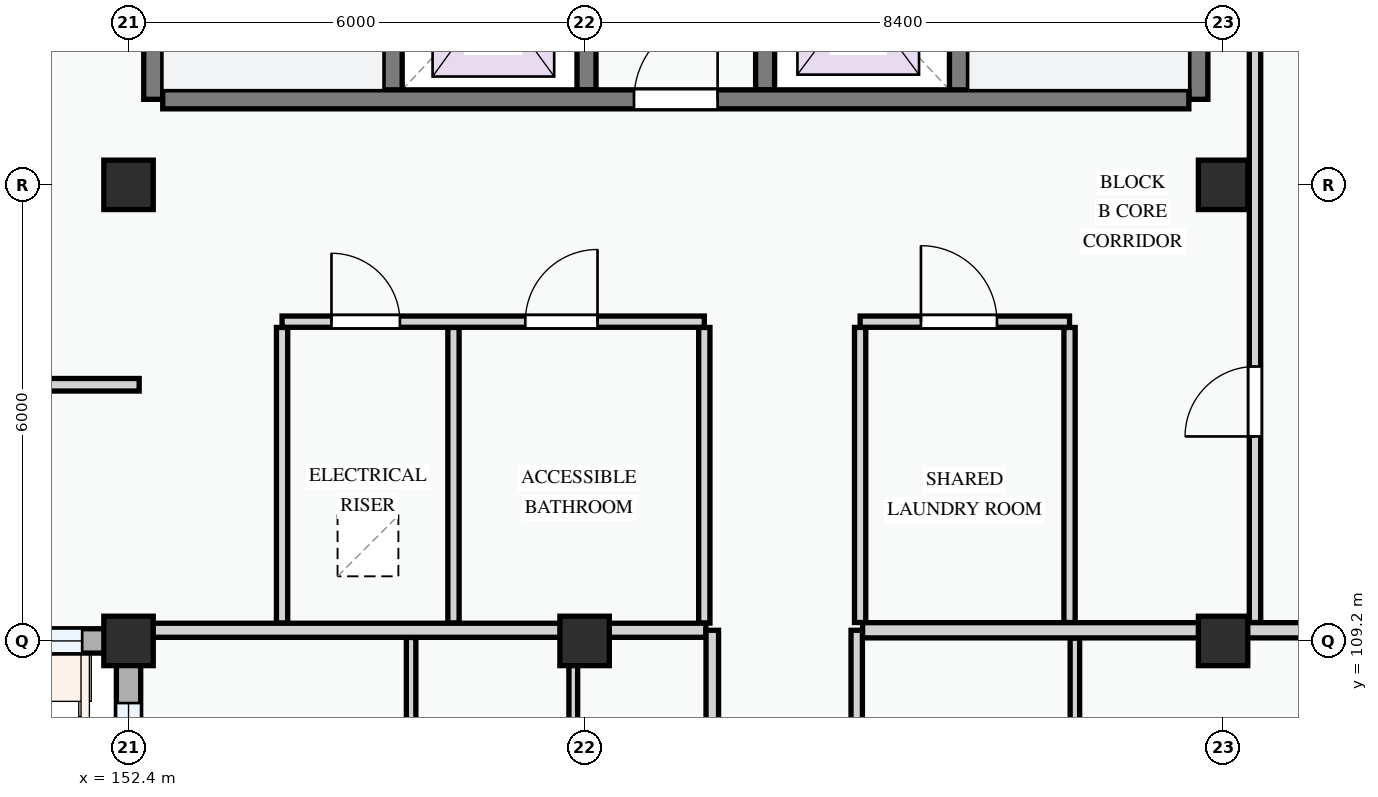
"""IFC4 building model, lengths in metres.
Left out: names, types, materials, properties, quantities, classifications, styles, units other than length and angle.
Written with IfcOpenShell. Run it as: python <this file> out.ifc"""

import sys

from ifc_helpers import new_model, si_unit, direction, frame, frame_2d, origin, origin_2d, place, context, subcontext, project, spatial, rectangle, extrude, element, fill, save


model = new_model("IFC4")
c1 = context("Model", 3, precision=1e-05, world=origin(), true_north=direction((0.0, 1.0)))
c2 = subcontext(c1, "Body", "Model", "MODEL_VIEW")
j1 = project(units=[si_unit("LENGTHUNIT", "METRE"), si_unit("PLANEANGLEUNIT", "RADIAN")], contexts=[c1])
p1 = place(None, origin())
s1 = spatial("IfcSite", under=j1, at=p1, CompositionType="ELEMENT")
p2 = place(p1, origin())
s2 = spatial("IfcBuilding", under=s1, at=p2, CompositionType="ELEMENT")
p3 = place(p2, frame((0.0, 0.0, 18.0)))
s3 = spatial("IfcBuildingStorey", under=s2, at=p3, CompositionType="ELEMENT", Elevation=18.0)
for number, where, z_axis, x_axis in (
    (1, (152.4, 109.2, 0.0), (0.0, 0.0, 1.0), (1.0, 0.0, 0.0)),
    (2, (152.4, 115.2, 0.0), (0.0, 0.0, 1.0), (1.0, 0.0, 0.0)),
    (3, (158.4, 109.2, 0.0), (0.0, 0.0, 1.0), (1.0, 0.0, 0.0)),
    (4, (166.8, 109.2, 0.0), (0.0, 0.0, 1.0), (1.0, 0.0, 0.0)),
    (5, (166.8, 115.2, 0.0), (0.0, 0.0, 1.0), (1.0, 0.0, 0.0)),
):
    element("IfcColumn", number, at=place(p3, frame(where, z_axis=z_axis, x_axis=x_axis)), inside=s3, PredefinedType="COLUMN", context=c2, shape_type="SweptSolid", body=[
        extrude(rectangle(XDim=0.65, YDim=0.65, at=origin_2d()), origin(), (0.0, 0.0, 1.0), 3.3),
    ])
p4 = place(p3, frame((144.0, 109.2, 0.0), z_axis=(0.0, 0.0, 1.0), x_axis=(1.0, 0.0, 0.0)))
e6 = element("IfcWall", 6, at=p4, inside=s3, PredefinedType="STANDARD", context=c2, shape_type="SweptSolid", body=[
    extrude(rectangle(XDim=8.4, YDim=0.32, at=frame_2d((4.2, 0.0))), origin(), (0.0, 0.0, 1.0), 2.375),
])
p5 = place(p4, frame((0.6, 0.0, 0.78)))
e7 = element("IfcOpeningElement", 7, at=p5, cuts=e6, PredefinedType="OPENING", context=c2, shape_type="SweptSolid", body=[
    extrude(rectangle(XDim=2.18, YDim=1.48, at=frame_2d((1.09, 0.74))), frame((0.0, 0.17, 0.0), z_axis=(0.0, -1.0, 0.0), x_axis=(1.0, 0.0, 0.0)), (0.0, 0.0, 1.0), 0.34),
])
p6 = place(p4, frame((3.9, 0.0, 0.78)))
e8 = element("IfcOpeningElement", 8, at=p6, cuts=e6, PredefinedType="OPENING", context=c2, shape_type="SweptSolid", body=[
    extrude(rectangle(XDim=1.3, YDim=1.4, at=frame_2d((0.65, 0.7))), frame((0.0, 0.17, 0.0), z_axis=(0.0, -1.0, 0.0), x_axis=(1.0, 0.0, 0.0)), (0.0, 0.0, 1.0), 0.34),
])
p7 = place(p4, frame((6.47, 0.0, 0.78)))
e9 = element("IfcOpeningElement", 9, at=p7, cuts=e6, PredefinedType="OPENING", context=c2, shape_type="SweptSolid", body=[
    extrude(rectangle(XDim=1.32, YDim=1.35, at=frame_2d((0.66, 0.675))), frame((0.0, 0.17, 0.0), z_axis=(0.0, -1.0, 0.0), x_axis=(1.0, 0.0, 0.0)), (0.0, 0.0, 1.0), 0.34),
])
p8 = place(p3, frame((152.4, 109.2, 0.0), z_axis=(0.0, 0.0, 1.0), x_axis=(0.0, -1.0, 0.0)))
e10 = element("IfcWall", 10, at=p8, inside=s3, PredefinedType="STANDARD", context=c2, shape_type="SweptSolid", body=[
    extrude(rectangle(XDim=8.4, YDim=0.32, at=frame_2d((4.2, 0.0))), origin(), (0.0, 0.0, 1.0), 2.425),
])
p9 = place(p8, frame((0.817, 0.0, 0.78)))
e11 = element("IfcOpeningElement", 11, at=p9, cuts=e10, PredefinedType="OPENING", context=c2, shape_type="SweptSolid", body=[
    extrude(rectangle(XDim=1.25, YDim=1.45, at=frame_2d((0.625, 0.725))), frame((0.0, 0.17, 0.0), z_axis=(0.0, -1.0, 0.0), x_axis=(1.0, 0.0, 0.0)), (0.0, 0.0, 1.0), 0.34),
])
p10 = place(p8, frame((2.998, 0.0, 0.78)))
e12 = element("IfcOpeningElement", 12, at=p10, cuts=e10, PredefinedType="OPENING", context=c2, shape_type="SweptSolid", body=[
    extrude(rectangle(XDim=1.62, YDim=1.38, at=frame_2d((0.81, 0.69))), frame((0.0, 0.17, 0.0), z_axis=(0.0, -1.0, 0.0), x_axis=(1.0, 0.0, 0.0)), (0.0, 0.0, 1.0), 0.34),
])
p11 = place(p8, frame((5.935, 0.0, 0.78)))
e13 = element("IfcOpeningElement", 13, at=p11, cuts=e10, PredefinedType="OPENING", context=c2, shape_type="SweptSolid", body=[
    extrude(rectangle(XDim=1.4, YDim=1.45, at=frame_2d((0.7, 0.725))), frame((0.0, 0.17, 0.0), z_axis=(0.0, -1.0, 0.0), x_axis=(1.0, 0.0, 0.0)), (0.0, 0.0, 1.0), 0.34),
])
p12 = place(p3, frame((155.875, 123.25, 0.0), z_axis=(0.0, 0.0, 1.0), x_axis=(0.0, -1.0, 0.0)))
e14 = element("IfcWall", 14, at=p12, inside=s3, PredefinedType="SHEAR", context=c2, shape_type="SweptSolid", body=[
    extrude(rectangle(XDim=6.925, YDim=0.25, at=frame_2d((3.462, 0.0))), origin(), (0.0, 0.0, 1.0), 3.0),
])
p13 = place(p12, frame((0.35, 0.0, 0.0)))
e15 = element("IfcOpeningElement", 15, at=p13, cuts=e14, PredefinedType="OPENING", context=c2, shape_type="SweptSolid", body=[
    extrude(rectangle(XDim=0.95, YDim=2.1, at=frame_2d((0.475, 1.05))), frame((0.0, 0.135, 0.0), z_axis=(0.0, -1.0, 0.0), x_axis=(1.0, 0.0, 0.0)), (0.0, 0.0, 1.0), 0.27),
])
p14 = place(p3, frame((152.725, 123.4, 0.0), z_axis=(0.0, 0.0, 1.0), x_axis=(0.0, -1.0, 0.0)))
e16 = element("IfcWall", 16, at=p14, inside=s3, PredefinedType="SHEAR", context=c2, shape_type="SweptSolid", body=[
    extrude(rectangle(XDim=7.075, YDim=0.25, at=frame_2d((3.538, 0.0))), origin(), (0.0, 0.0, 1.0), 3.0),
])
p15 = place(p3, frame((166.475, 123.25, 0.0), z_axis=(0.0, 0.0, 1.0), x_axis=(0.0, -1.0, 0.0)))
e17 = element("IfcWall", 17, at=p15, inside=s3, PredefinedType="SHEAR", context=c2, shape_type="SweptSolid", body=[
    extrude(rectangle(XDim=6.925, YDim=0.25, at=frame_2d((3.462, 0.0))), origin(), (0.0, 0.0, 1.0), 3.0),
])
p16 = place(p3, frame((163.325, 123.25, 0.0), z_axis=(0.0, 0.0, 1.0), x_axis=(0.0, -1.0, 0.0)))
e18 = element("IfcWall", 18, at=p16, inside=s3, PredefinedType="SHEAR", context=c2, shape_type="SweptSolid", body=[
    extrude(rectangle(XDim=6.925, YDim=0.25, at=frame_2d((3.462, 0.0))), origin(), (0.0, 0.0, 1.0), 3.0),
])
p17 = place(p16, frame((0.35, 0.0, 0.0)))
e19 = element("IfcOpeningElement", 19, at=p17, cuts=e18, PredefinedType="OPENING", context=c2, shape_type="SweptSolid", body=[
    extrude(rectangle(XDim=0.95, YDim=2.1, at=frame_2d((0.475, 1.05))), frame((0.0, 0.135, 0.0), z_axis=(0.0, -1.0, 0.0), x_axis=(1.0, 0.0, 0.0)), (0.0, 0.0, 1.0), 0.27),
])
for number, where, z_axis, x_axis in (
    (20, (158.425, 118.875, 0.0), (0.0, 0.0, 1.0), (0.0, -1.0, 0.0)),
    (21, (160.775, 118.875, 0.0), (0.0, 0.0, 1.0), (0.0, -1.0, 0.0)),
):
    element("IfcWall", number, at=place(p3, frame(where, z_axis=z_axis, x_axis=x_axis)), inside=s3, PredefinedType="SHEAR", context=c2, shape_type="SweptSolid", body=[
        extrude(rectangle(XDim=2.425, YDim=0.25, at=frame_2d((1.212, 0.0))), origin(), (0.0, 0.0, 1.0), 3.0),
    ])
p18 = place(p3, frame((152.85, 116.325, 0.0), z_axis=(0.0, 0.0, 1.0), x_axis=(1.0, 0.0, 0.0)))
e22 = element("IfcWall", 22, at=p18, inside=s3, PredefinedType="SHEAR", context=c2, shape_type="SweptSolid", body=[
    extrude(rectangle(XDim=13.5, YDim=0.25, at=frame_2d((6.75, 0.0))), origin(), (0.0, 0.0, 1.0), 3.0),
])
p19 = place(p18, frame((6.2, 0.0, 0.0)))
e23 = element("IfcOpeningElement", 23, at=p19, cuts=e22, PredefinedType="OPENING", context=c2, shape_type="SweptSolid", body=[
    extrude(rectangle(XDim=1.1, YDim=2.15, at=frame_2d((0.55, 1.075))), frame((0.0, 0.135, 0.0), z_axis=(0.0, -1.0, 0.0), x_axis=(1.0, 0.0, 0.0)), (0.0, 0.0, 1.0), 0.27),
])
for number, where, z_axis, x_axis in (
    (24, (154.42, 113.324, 0.0), (0.0, 0.0, 1.0), (0.0, -1.0, 0.0)),
    (25, (156.675, 113.324, 0.0), (0.0, 0.0, 1.0), (0.0, -1.0, 0.0)),
    (26, (159.975, 113.324, 0.0), (0.0, 0.0, 1.0), (0.0, -1.0, 0.0)),
):
    element("IfcWall", number, at=place(p3, frame(where, z_axis=z_axis, x_axis=x_axis)), inside=s3, PredefinedType="PARTITIONING", context=c2, shape_type="SweptSolid", body=[
        extrude(rectangle(XDim=3.889, YDim=0.148, at=frame_2d((1.945, 0.0))), origin(), (0.0, 0.0, 1.0), 3.0),
    ])
for number, where, z_axis, x_axis in (
    (27, (162.025, 113.324, 0.0), (0.0, 0.0, 1.0), (0.0, -1.0, 0.0)),
    (28, (164.78, 113.324, 0.0), (0.0, 0.0, 1.0), (0.0, -1.0, 0.0)),
):
    element("IfcWall", number, at=place(p3, frame(where, z_axis=z_axis, x_axis=x_axis)), inside=s3, PredefinedType="PARTITIONING", context=c2, shape_type="SweptSolid", body=[
        extrude(rectangle(XDim=3.882, YDim=0.148, at=frame_2d((1.941, 0.0))), origin(), (0.0, 0.0, 1.0), 3.0),
    ])
p20 = place(p3, frame((154.42, 113.4, 0.0), z_axis=(0.0, 0.0, 1.0), x_axis=(1.0, 0.0, 0.0)))
e29 = element("IfcWall", 29, at=p20, inside=s3, PredefinedType="PARTITIONING", context=c2, shape_type="SweptSolid", body=[
    extrude(rectangle(XDim=5.555, YDim=0.148, at=frame_2d((2.778, 0.0))), origin(), (0.0, 0.0, 1.0), 3.0),
])
p21 = place(p20, frame((0.65, 0.0, 0.0)))
e30 = element("IfcOpeningElement", 30, at=p21, cuts=e29, PredefinedType="OPENING", context=c2, shape_type="SweptSolid", body=[
    extrude(rectangle(XDim=0.9, YDim=2.1, at=frame_2d((0.45, 1.05))), frame((0.0, 0.084, 0.0), z_axis=(0.0, -1.0, 0.0), x_axis=(1.0, 0.0, 0.0)), (0.0, 0.0, 1.0), 0.168),
])
p22 = place(p20, frame((3.2, 0.0, 0.0)))
e31 = element("IfcOpeningElement", 31, at=p22, cuts=e29, PredefinedType="OPENING", context=c2, shape_type="SweptSolid", body=[
    extrude(rectangle(XDim=0.95, YDim=2.1, at=frame_2d((0.475, 1.05))), frame((0.0, 0.084, 0.0), z_axis=(0.0, -1.0, 0.0), x_axis=(1.0, 0.0, 0.0)), (0.0, 0.0, 1.0), 0.168),
])
p23 = place(p3, frame((162.025, 113.4, 0.0), z_axis=(0.0, 0.0, 1.0), x_axis=(1.0, 0.0, 0.0)))
e32 = element("IfcWall", 32, at=p23, inside=s3, PredefinedType="PARTITIONING", context=c2, shape_type="SweptSolid", body=[
    extrude(rectangle(XDim=2.755, YDim=0.148, at=frame_2d((1.377, 0.0))), origin(), (0.0, 0.0, 1.0), 3.0),
])
p24 = place(p23, frame((0.8, 0.0, 0.0)))
e33 = element("IfcOpeningElement", 33, at=p24, cuts=e32, PredefinedType="OPENING", context=c2, shape_type="SweptSolid", body=[
    extrude(rectangle(XDim=1.0, YDim=2.15, at=frame_2d((0.5, 1.075))), frame((0.0, 0.084, 0.0), z_axis=(0.0, -1.0, 0.0), x_axis=(1.0, 0.0, 0.0)), (0.0, 0.0, 1.0), 0.168),
])
p25 = place(p3, frame((150.127, 112.57, 0.0), z_axis=(0.0, 0.0, 1.0), x_axis=(1.0, 0.0, 0.0)))
e34 = element("IfcWall", 34, at=p25, inside=s3, PredefinedType="PARTITIONING", context=c2, shape_type="SweptSolid", body=[
    extrude(rectangle(XDim=2.413, YDim=0.165, at=frame_2d((1.207, 0.0))), origin(), (0.0, 0.0, 1.0), 3.0),
])
p26 = place(p3, frame((167.22, 109.442, 0.0), z_axis=(0.0, 0.0, 1.0), x_axis=(0.0, 1.0, 0.0)))
e35 = element("IfcWall", 35, at=p26, inside=s3, PredefinedType="PARTITIONING", context=c2, shape_type="SweptSolid", body=[
    extrude(rectangle(XDim=14.018, YDim=0.15, at=frame_2d((7.009, 0.0))), origin(), (0.0, 0.0, 1.0), 2.425),
])
p27 = place(p26, frame((2.448, 0.0, 0.0)))
e36 = element("IfcOpeningElement", 36, at=p27, cuts=e35, PredefinedType="OPENING", context=c2, shape_type="SweptSolid", body=[
    extrude(rectangle(XDim=0.92, YDim=2.1, at=frame_2d((0.46, 1.05))), frame((0.0, 0.085, 0.0), z_axis=(0.0, -1.0, 0.0), x_axis=(1.0, 0.0, 0.0)), (0.0, 0.0, 1.0), 0.17),
])
p28 = place(p3, frame((156.118, 104.212, 0.0), z_axis=(0.0, 0.0, 1.0), x_axis=(0.0, 1.0, 0.0)))
e37 = element("IfcWall", 37, at=p28, inside=s3, PredefinedType="PARTITIONING", context=c2, shape_type="SweptSolid", body=[
    extrude(rectangle(XDim=5.034, YDim=0.125, at=frame_2d((2.517, 0.0))), origin(), (0.0, 0.0, 1.0), 3.0),
])
p29 = place(p3, frame((158.251, 104.212, 0.0), z_axis=(0.0, 0.0, 1.0), x_axis=(0.0, 1.0, 0.0)))
e38 = element("IfcWall", 38, at=p29, inside=s3, PredefinedType="PARTITIONING", context=c2, shape_type="SweptSolid", body=[
    extrude(rectangle(XDim=5.034, YDim=0.115, at=frame_2d((2.517, 0.0))), origin(), (0.0, 0.0, 1.0), 2.425),
])
p30 = place(p3, frame((164.85, 103.984, 0.0), z_axis=(0.0, 0.0, 1.0), x_axis=(0.0, 1.0, 0.0)))
e39 = element("IfcWall", 39, at=p30, inside=s3, PredefinedType="PARTITIONING", context=c2, shape_type="SweptSolid", body=[
    extrude(rectangle(XDim=5.254, YDim=0.125, at=frame_2d((2.627, 0.0))), origin(), (0.0, 0.0, 1.0), 3.0),
])
p31 = place(p3, frame((152.46, 109.34, 0.0), z_axis=(0.0, 0.0, 1.0), x_axis=(1.0, 0.0, 0.0)))
e40 = element("IfcWall", 40, at=p31, inside=s3, PredefinedType="PARTITIONING", context=c2, shape_type="SweptSolid", body=[
    extrude(rectangle(XDim=7.536, YDim=0.185, at=frame_2d((3.768, 0.0))), origin(), (0.0, 0.0, 1.0), 2.375),
])
p32 = place(p3, frame((162.057, 109.34, 0.0), z_axis=(0.0, 0.0, 1.0), x_axis=(1.0, 0.0, 0.0)))
e41 = element("IfcWall", 41, at=p32, inside=s3, PredefinedType="PARTITIONING", context=c2, shape_type="SweptSolid", body=[
    extrude(rectangle(XDim=11.781, YDim=0.2, at=frame_2d((5.891, 0.0))), origin(), (0.0, 0.0, 1.0), 2.375),
])
p33 = place(p3, frame((160.08, 80.46, 0.0), z_axis=(0.0, 0.0, 1.0), x_axis=(0.0, 1.0, 0.0)))
e42 = element("IfcWall", 42, at=p33, inside=s3, PredefinedType="PARTITIONING", context=c2, shape_type="SweptSolid", body=[
    extrude(rectangle(XDim=28.88, YDim=0.165, at=frame_2d((14.44, 0.0))), origin(), (0.0, 0.0, 1.0), 3.0),
])
p34 = place(p33, frame((2.419, 0.0, 0.0)))
e43 = element("IfcOpeningElement", 43, at=p34, cuts=e42, PredefinedType="OPENING", context=c2, shape_type="SweptSolid", body=[
    extrude(rectangle(XDim=0.96, YDim=2.12, at=frame_2d((0.48, 1.06))), frame((0.0, 0.093, 0.0), z_axis=(0.0, -1.0, 0.0), x_axis=(1.0, 0.0, 0.0)), (0.0, 0.0, 1.0), 0.185),
])
p35 = place(p33, frame((9.676, 0.0, 0.0)))
e44 = element("IfcOpeningElement", 44, at=p35, cuts=e42, PredefinedType="OPENING", context=c2, shape_type="SweptSolid", body=[
    extrude(rectangle(XDim=0.92, YDim=2.1, at=frame_2d((0.46, 1.05))), frame((0.0, 0.093, 0.0), z_axis=(0.0, -1.0, 0.0), x_axis=(1.0, 0.0, 0.0)), (0.0, 0.0, 1.0), 0.185),
])
p36 = place(p33, frame((22.47, 0.0, 0.0)))
e45 = element("IfcOpeningElement", 45, at=p36, cuts=e42, PredefinedType="OPENING", context=c2, shape_type="SweptSolid", body=[
    extrude(rectangle(XDim=0.92, YDim=2.1, at=frame_2d((0.46, 1.05))), frame((0.0, 0.093, 0.0), z_axis=(0.0, -1.0, 0.0), x_axis=(1.0, 0.0, 0.0)), (0.0, 0.0, 1.0), 0.185),
])
p37 = place(p3, frame((161.98, 80.46, 0.0), z_axis=(0.0, 0.0, 1.0), x_axis=(0.0, 1.0, 0.0)))
e46 = element("IfcWall", 46, at=p37, inside=s3, PredefinedType="PARTITIONING", context=c2, shape_type="SweptSolid", body=[
    extrude(rectangle(XDim=28.88, YDim=0.15, at=frame_2d((14.44, 0.0))), origin(), (0.0, 0.0, 1.0), 3.0),
])
p38 = place(p37, frame((2.441, 0.0, 0.0)))
e47 = element("IfcOpeningElement", 47, at=p38, cuts=e46, PredefinedType="OPENING", context=c2, shape_type="SweptSolid", body=[
    extrude(rectangle(XDim=0.92, YDim=2.1, at=frame_2d((0.46, 1.05))), frame((0.0, 0.085, 0.0), z_axis=(0.0, -1.0, 0.0), x_axis=(1.0, 0.0, 0.0)), (0.0, 0.0, 1.0), 0.17),
])
p39 = place(p37, frame((9.677, 0.0, 0.0)))
e48 = element("IfcOpeningElement", 48, at=p39, cuts=e46, PredefinedType="OPENING", context=c2, shape_type="SweptSolid", body=[
    extrude(rectangle(XDim=0.92, YDim=2.1, at=frame_2d((0.46, 1.05))), frame((0.0, 0.085, 0.0), z_axis=(0.0, -1.0, 0.0), x_axis=(1.0, 0.0, 0.0)), (0.0, 0.0, 1.0), 0.17),
])
p40 = place(p37, frame((22.262, 0.0, 0.0)))
e49 = element("IfcOpeningElement", 49, at=p40, cuts=e46, PredefinedType="OPENING", context=c2, shape_type="SweptSolid", body=[
    extrude(rectangle(XDim=0.96, YDim=2.12, at=frame_2d((0.48, 1.06))), frame((0.0, 0.085, 0.0), z_axis=(0.0, -1.0, 0.0), x_axis=(1.0, 0.0, 0.0)), (0.0, 0.0, 1.0), 0.17),
])
p41 = place(p7, origin())
e50 = element("IfcWindow", 50, at=p41, inside=s3, PartitioningType="SINGLE_PANEL", PredefinedType="WINDOW", context=c2, shape_type="SweptSolid", body=[
    extrude(rectangle(XDim=1.32, YDim=1.35, at=frame_2d((0.66, 0.675))), frame((0.0, 0.03, 0.0), z_axis=(0.0, -1.0, 0.0), x_axis=(1.0, 0.0, 0.0)), (0.0, 0.0, 1.0), 0.06),
])
fill(e9, e50)
p42 = place(p9, origin())
e51 = element("IfcWindow", 51, at=p42, inside=s3, PartitioningType="SINGLE_PANEL", PredefinedType="WINDOW", context=c2, shape_type="SweptSolid", body=[
    extrude(rectangle(XDim=1.25, YDim=1.45, at=frame_2d((0.625, 0.725))), frame((0.0, 0.03, 0.0), z_axis=(0.0, -1.0, 0.0), x_axis=(1.0, 0.0, 0.0)), (0.0, 0.0, 1.0), 0.06),
])
fill(e11, e51)
p43 = place(p19, origin())
e52 = element("IfcDoor", 52, at=p43, inside=s3, OperationType="SINGLE_SWING_RIGHT", PredefinedType="DOOR", context=c2, shape_type="SweptSolid", body=[
    extrude(rectangle(XDim=1.1, YDim=2.15, at=frame_2d((0.55, 1.075))), frame((0.0, 0.025, 0.0), z_axis=(0.0, -1.0, 0.0), x_axis=(1.0, 0.0, 0.0)), (0.0, 0.0, 1.0), 0.05),
])
fill(e23, e52)
p44 = place(p21, origin())
e53 = element("IfcDoor", 53, at=p44, inside=s3, OperationType="SINGLE_SWING_LEFT", PredefinedType="DOOR", context=c2, shape_type="SweptSolid", body=[
    extrude(rectangle(XDim=0.9, YDim=2.1, at=frame_2d((0.45, 1.05))), frame((0.0, 0.025, 0.0), z_axis=(0.0, -1.0, 0.0), x_axis=(1.0, 0.0, 0.0)), (0.0, 0.0, 1.0), 0.05),
])
fill(e30, e53)
p45 = place(p22, origin())
e54 = element("IfcDoor", 54, at=p45, inside=s3, OperationType="SINGLE_SWING_RIGHT", PredefinedType="DOOR", context=c2, shape_type="SweptSolid", body=[
    extrude(rectangle(XDim=0.95, YDim=2.1, at=frame_2d((0.475, 1.05))), frame((0.0, 0.025, 0.0), z_axis=(0.0, -1.0, 0.0), x_axis=(1.0, 0.0, 0.0)), (0.0, 0.0, 1.0), 0.05),
])
fill(e31, e54)
p46 = place(p24, origin())
e55 = element("IfcDoor", 55, at=p46, inside=s3, OperationType="SINGLE_SWING_LEFT", PredefinedType="DOOR", context=c2, shape_type="SweptSolid", body=[
    extrude(rectangle(XDim=1.0, YDim=2.15, at=frame_2d((0.5, 1.075))), frame((0.0, 0.025, 0.0), z_axis=(0.0, -1.0, 0.0), x_axis=(1.0, 0.0, 0.0)), (0.0, 0.0, 1.0), 0.05),
])
fill(e33, e55)
p47 = place(p27, origin())
e56 = element("IfcDoor", 56, at=p47, inside=s3, OperationType="SINGLE_SWING_LEFT", PredefinedType="DOOR", context=c2, shape_type="SweptSolid", body=[
    extrude(rectangle(XDim=0.92, YDim=2.1, at=frame_2d((0.46, 1.05))), frame((0.0, 0.025, 0.0), z_axis=(0.0, -1.0, 0.0), x_axis=(1.0, 0.0, 0.0)), (0.0, 0.0, 1.0), 0.05),
])
fill(e36, e56)
save(model, sys.argv[1])
